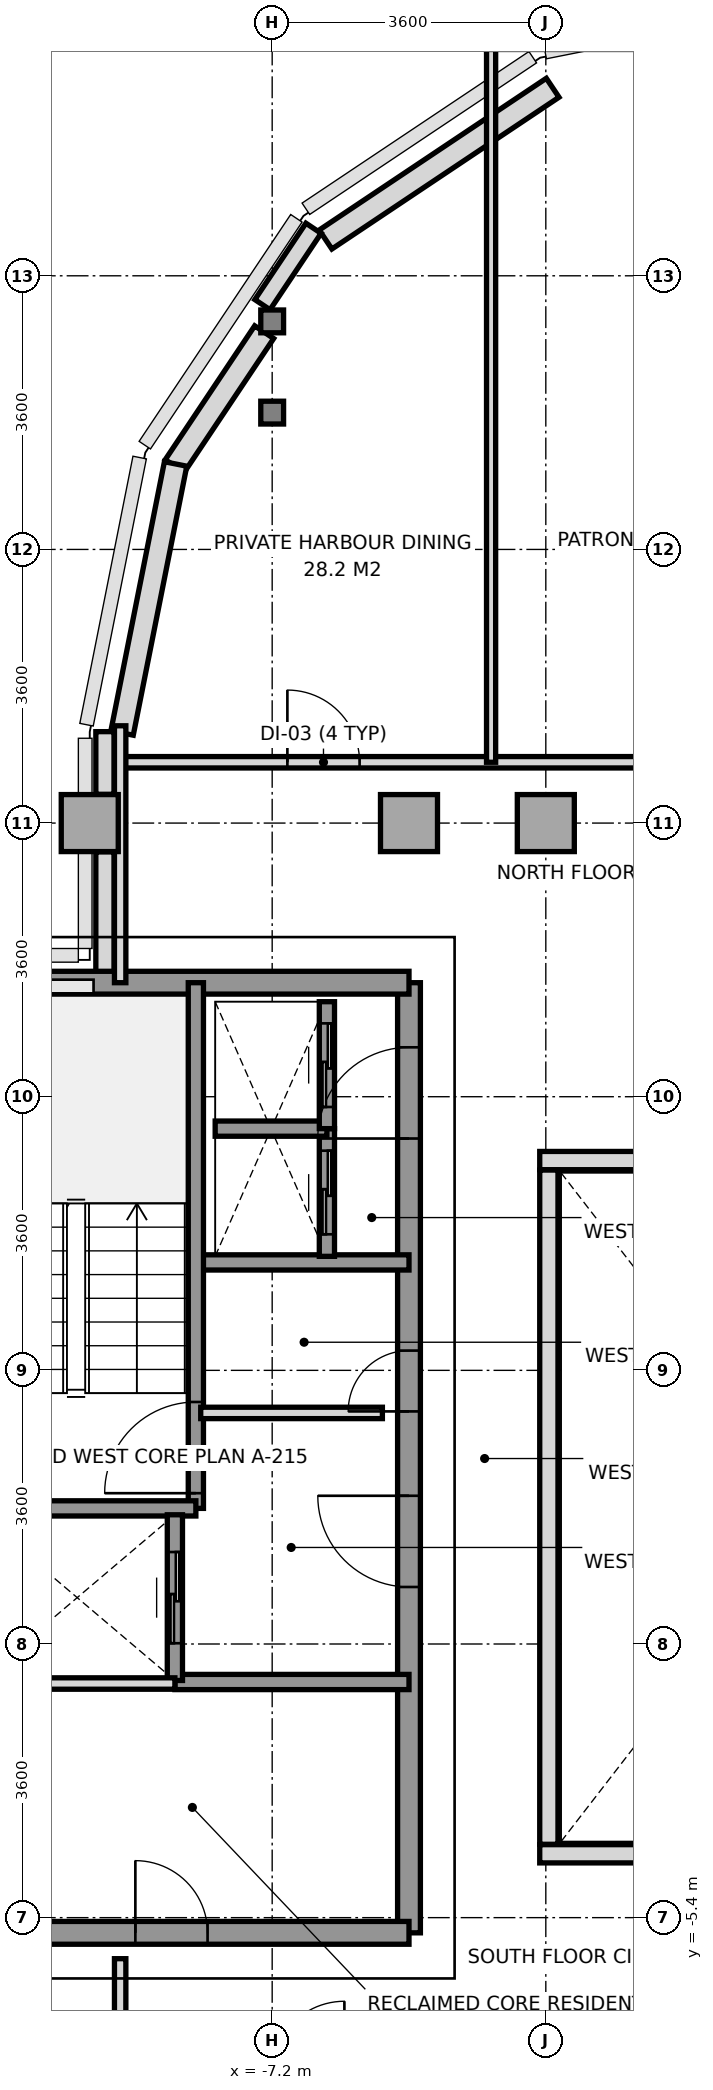
"""IFC4 building model, lengths in metres.
Left out: names, types, materials, properties, quantities, classifications, styles, units other than length and angle.
Written with IfcOpenShell. Run it as: python <this file> out.ifc"""

import sys

from ifc_helpers import new_model, si_unit, direction, frame, frame_2d, origin, origin_2d, place, context, subcontext, project, spatial, rectangle, i_section, extrude, source, transform, mapped, element, fill, save


model = new_model("IFC4")
c1 = context("Model", 3, precision=1e-05, world=origin(), true_north=direction((0.0, 1.0)))
c2 = subcontext(c1, "Body", "Model", "MODEL_VIEW")
j1 = project(units=[si_unit("LENGTHUNIT", "METRE"), si_unit("PLANEANGLEUNIT", "RADIAN")], contexts=[c1])
p1 = place(None, origin())
s1 = spatial("IfcSite", under=j1, at=p1, CompositionType="ELEMENT")
p2 = place(p1, origin())
s2 = spatial("IfcBuilding", under=s1, at=p2, CompositionType="ELEMENT")
p3 = place(p2, frame((0.0, 0.0, 249.2)))
s3 = spatial("IfcBuildingStorey", under=s2, at=p3, CompositionType="ELEMENT", Elevation=249.2)
m1 = source(origin(), c2, "Body", "SweptSolid", [
    extrude(rectangle(XDim=0.75, YDim=0.75, at=origin_2d()), origin(), (0.0, 0.0, 1.0), 3.01),
])
p4 = place(p3, frame((-9.6, 9.0, 0.0), z_axis=(0.0, 0.0, 1.0), x_axis=(1.0, 0.0, 0.0)))
e1 = element("IfcColumn", 1, at=p4, inside=s3, PredefinedType="COLUMN", context=c2, shape_type="MappedRepresentation", body=[
    mapped(m1, transform((0.0, 0.0, 0.0), x_axis=(1.0, 0.0, 0.0), y_axis=(0.0, 1.0, 0.0), z_axis=(0.0, 0.0, 1.0), scale=1.0)),
])
m2 = source(origin(), c2, "Body", "SweptSolid", [
    extrude(i_section(OverallWidth=0.3, OverallDepth=0.3, WebThickness=0.011, FlangeThickness=0.019, at=origin_2d()), origin(), (0.0, 0.0, 1.0), 3.01),
])
for number, where, z_axis, x_axis in (
    (2, (-7.2, 14.4, 0.0), (0.0, 0.0, 1.0), (1.0, 0.0, 0.0)),
    (3, (-7.2, 15.6, 0.0), (0.0, 0.0, 1.0), (1.0, 0.0, 0.0)),
):
    element("IfcColumn", number, at=place(p3, frame(where, z_axis=z_axis, x_axis=x_axis)), inside=s3, PredefinedType="COLUMN", context=c2, shape_type="MappedRepresentation", body=[
        mapped(m2, transform((0.0, 0.0, 0.0), x_axis=(1.0, 0.0, 0.0), y_axis=(0.0, 1.0, 0.0), z_axis=(0.0, 0.0, 1.0), scale=1.0)),
    ])
for number, where, z_axis, x_axis in (
    (4, (-5.4, 9.0, 0.0), (0.0, 0.0, 1.0), (1.0, 0.0, 0.0)),
    (5, (-3.6, 9.0, 0.0), (0.0, 0.0, 1.0), (1.0, 0.0, 0.0)),
):
    element("IfcColumn", number, at=place(p3, frame(where, z_axis=z_axis, x_axis=x_axis)), inside=s3, PredefinedType="COLUMN", context=c2, shape_type="MappedRepresentation", body=[
        mapped(m1, transform((0.0, 0.0, 0.0), x_axis=(1.0, 0.0, 0.0), y_axis=(0.0, 1.0, 0.0), z_axis=(0.0, 0.0, 1.0), scale=1.0)),
    ])
p5 = place(p3, frame((-3.51, 18.674, 0.0), z_axis=(0.0, 0.0, 1.0), x_axis=(-0.831443568068, -0.555609208993, 0.0)))
e6 = element("IfcWall", 6, at=p5, inside=s3, PredefinedType="SOLIDWALL", context=c2, shape_type="SweptSolid", body=[
    extrude(rectangle(XDim=3.594, YDim=0.3, at=frame_2d((1.797, 0.0))), origin(), (0.0, 0.0, 1.0), 3.01),
])
p6 = place(p3, frame((-7.305, 15.458, 0.0), z_axis=(0.0, 0.0, 1.0), x_axis=(-0.555604299396, -0.831446848868, 0.0)))
e7 = element("IfcWall", 7, at=p6, inside=s3, PredefinedType="SOLIDWALL", context=c2, shape_type="SweptSolid", body=[
    extrude(rectangle(XDim=2.118, YDim=0.3, at=frame_2d((1.059, 0.0))), origin(), (0.0, 0.0, 1.0), 2.61),
])
p7 = place(p3, frame((-8.471, 13.725, 0.0), z_axis=(0.0, 0.0, 1.0), x_axis=(-0.195114232679, -0.980780523974, 0.0)))
e8 = element("IfcWall", 8, at=p7, inside=s3, PredefinedType="SOLIDWALL", context=c2, shape_type="SweptSolid", body=[
    extrude(rectangle(XDim=3.609, YDim=0.3, at=frame_2d((1.804, 0.0))), origin(), (0.0, 0.0, 1.0), 3.01),
])
p8 = place(p3, frame((-9.4, 6.953, 0.0), z_axis=(0.0, 0.0, 1.0), x_axis=(0.0, 1.0, 0.0)))
e9 = element("IfcWall", 9, at=p8, inside=s3, PredefinedType="PARAPET", context=c2, shape_type="SweptSolid", body=[
    extrude(rectangle(XDim=1.669, YDim=0.24, at=frame_2d((0.834, 0.0))), origin(), (0.0, 0.0, 1.0), 1.15),
])
p9 = place(p3, frame((-9.4, 9.378, 0.0), z_axis=(0.0, 0.0, 1.0), x_axis=(0.0, 1.0, 0.0)))
e10 = element("IfcWall", 10, at=p9, inside=s3, PredefinedType="PARAPET", context=c2, shape_type="SweptSolid", body=[
    extrude(rectangle(XDim=0.825, YDim=0.24, at=frame_2d((0.413, 0.0))), origin(), (0.0, 0.0, 1.0), 1.15),
])
p10 = place(p3, frame((-7.328, 15.82, 0.0), z_axis=(0.0, 0.0, 1.0), x_axis=(0.555585388542, 0.831459485506, 0.0)))
e11 = element("IfcWall", 11, at=p10, inside=s3, PredefinedType="PARAPET", context=c2, shape_type="SweptSolid", body=[
    extrude(rectangle(XDim=1.209, YDim=0.24, at=frame_2d((0.604, 0.0))), origin(), (0.0, 0.0, 1.0), 1.15),
])
p11 = place(p3, frame((-5.4, -5.6, 0.0), z_axis=(0.0, 0.0, 1.0), x_axis=(0.0, 1.0, 0.0)))
e12 = element("IfcWall", 12, at=p11, inside=s3, PredefinedType="SHEAR", context=c2, shape_type="SweptSolid", body=[
    extrude(rectangle(XDim=12.5, YDim=0.3, at=frame_2d((6.25, 0.0))), origin(), (0.0, 0.0, 1.0), 3.01),
])
p12 = place(p11, frame((4.55, 0.0, 0.0)))
e13 = element("IfcOpeningElement", 13, at=p12, cuts=e12, PredefinedType="OPENING", context=c2, shape_type="SweptSolid", body=[
    extrude(rectangle(XDim=1.2, YDim=2.2, at=frame_2d((0.6, 1.1))), frame((0.0, 0.16, 0.0), z_axis=(0.0, -1.0, 0.0), x_axis=(1.0, 0.0, 0.0)), (0.0, 0.0, 1.0), 0.32),
])
p13 = place(p11, frame((10.45, 0.0, 0.0)))
e14 = element("IfcOpeningElement", 14, at=p13, cuts=e12, PredefinedType="OPENING", context=c2, shape_type="SweptSolid", body=[
    extrude(rectangle(XDim=1.2, YDim=2.2, at=frame_2d((0.6, 1.1))), frame((0.0, 0.16, 0.0), z_axis=(0.0, -1.0, 0.0), x_axis=(1.0, 0.0, 0.0)), (0.0, 0.0, 1.0), 0.32),
])
p14 = place(p11, frame((6.86, 0.0, 0.0)))
e15 = element("IfcOpeningElement", 15, at=p14, cuts=e12, PredefinedType="OPENING", context=c2, shape_type="SweptSolid", body=[
    extrude(rectangle(XDim=0.8, YDim=2.1, at=frame_2d((0.4, 1.05))), frame((0.0, 0.16, 0.0), z_axis=(0.0, -1.0, 0.0), x_axis=(1.0, 0.0, 0.0)), (0.0, 0.0, 1.0), 0.32),
])
p15 = place(p3, frame((-11.356, 6.9, 0.0), z_axis=(0.0, 0.0, 1.0), x_axis=(1.0, 0.0, 0.0)))
e16 = element("IfcWall", 16, at=p15, inside=s3, PredefinedType="SHEAR", context=c2, shape_type="SweptSolid", body=[
    extrude(rectangle(XDim=5.956, YDim=0.3, at=frame_2d((2.978, 0.0))), origin(), (0.0, 0.0, 1.0), 3.01),
])
p16 = place(p3, frame((-13.2, -5.6, 0.0), z_axis=(0.0, 0.0, 1.0), x_axis=(1.0, 0.0, 0.0)))
e17 = element("IfcWall", 17, at=p16, inside=s3, PredefinedType="SHEAR", context=c2, shape_type="SweptSolid", body=[
    extrude(rectangle(XDim=7.8, YDim=0.3, at=frame_2d((3.9, 0.0))), origin(), (0.0, 0.0, 1.0), 3.01),
])
p17 = place(p16, frame((0.65, 0.0, 0.0)))
e18 = element("IfcOpeningElement", 18, at=p17, cuts=e17, PredefinedType="OPENING", context=c2, shape_type="SweptSolid", body=[
    extrude(rectangle(XDim=0.8, YDim=2.1, at=frame_2d((0.4, 1.05))), frame((0.0, 0.16, 0.0), z_axis=(0.0, -1.0, 0.0), x_axis=(1.0, 0.0, 0.0)), (0.0, 0.0, 1.0), 0.32),
])
p18 = place(p16, frame((4.2, 0.0, 0.0)))
e19 = element("IfcOpeningElement", 19, at=p18, cuts=e17, PredefinedType="OPENING", context=c2, shape_type="SweptSolid", body=[
    extrude(rectangle(XDim=0.95, YDim=2.15, at=frame_2d((0.475, 1.075))), frame((0.0, 0.16, 0.0), z_axis=(0.0, -1.0, 0.0), x_axis=(1.0, 0.0, 0.0)), (0.0, 0.0, 1.0), 0.32),
])
p19 = place(p3, frame((-8.18, 3.22, 0.0), z_axis=(0.0, 0.0, 1.0), x_axis=(1.0, 0.0, 0.0)))
e20 = element("IfcWall", 20, at=p19, inside=s3, PredefinedType="SOLIDWALL", context=c2, shape_type="SweptSolid", body=[
    extrude(rectangle(XDim=2.78, YDim=0.2, at=frame_2d((1.39, 0.0))), origin(), (0.0, 0.0, 1.0), 3.01),
])
p20 = place(p3, frame((-8.48, -2.3, 0.0), z_axis=(0.0, 0.0, 1.0), x_axis=(1.0, 0.0, 0.0)))
e21 = element("IfcWall", 21, at=p20, inside=s3, PredefinedType="SOLIDWALL", context=c2, shape_type="SweptSolid", body=[
    extrude(rectangle(XDim=3.08, YDim=0.2, at=frame_2d((1.54, 0.0))), origin(), (0.0, 0.0, 1.0), 3.01),
])
p21 = place(p3, frame((-8.204, -0.016, 0.0), z_axis=(0.0, 0.0, 1.0), x_axis=(0.0, 1.0, 0.0)))
e22 = element("IfcWall", 22, at=p21, inside=s3, PredefinedType="SOLIDWALL", context=c2, shape_type="SweptSolid", body=[
    extrude(rectangle(XDim=6.916, YDim=0.2, at=frame_2d((3.458, 0.0))), origin(), (0.0, 0.0, 1.0), 3.01),
])
p22 = place(p21, frame((0.2, 0.0, 0.0)))
e23 = element("IfcOpeningElement", 23, at=p22, cuts=e22, PredefinedType="OPENING", context=c2, shape_type="SweptSolid", body=[
    extrude(rectangle(XDim=1.2, YDim=2.2, at=frame_2d((0.6, 1.1))), frame((0.0, 0.11, 0.0), z_axis=(0.0, -1.0, 0.0), x_axis=(1.0, 0.0, 0.0)), (0.0, 0.0, 1.0), 0.22),
])
p23 = place(p3, frame((-11.356, -0.016, 0.0), z_axis=(0.0, 0.0, 1.0), x_axis=(1.0, 0.0, 0.0)))
e24 = element("IfcWall", 24, at=p23, inside=s3, PredefinedType="SOLIDWALL", context=c2, shape_type="SweptSolid", body=[
    extrude(rectangle(XDim=3.152, YDim=0.2, at=frame_2d((1.576, 0.0))), origin(), (0.0, 0.0, 1.0), 3.01),
])
p24 = place(p3, frame((-8.48, -2.28, 0.0), z_axis=(0.0, 0.0, 1.0), x_axis=(0.0, 1.0, 0.0)))
e25 = element("IfcWall", 25, at=p24, inside=s3, PredefinedType="SOLIDWALL", context=c2, shape_type="SweptSolid", body=[
    extrude(rectangle(XDim=2.18, YDim=0.2, at=frame_2d((1.09, 0.0))), origin(), (0.0, 0.0, 1.0), 3.01),
])
p25 = place(p24, frame((0.49, 0.0, 0.0)))
e26 = element("IfcOpeningElement", 26, at=p25, cuts=e25, PredefinedType="OPENING", context=c2, shape_type="SweptSolid", body=[
    extrude(rectangle(XDim=1.2, YDim=2.2, at=frame_2d((0.6, 1.1))), frame((0.0, 0.11, 0.0), z_axis=(0.0, -1.0, 0.0), x_axis=(1.0, 0.0, 0.0)), (0.0, 0.0, 1.0), 0.22),
])
p26 = place(p3, frame((-6.48, 3.3, 0.0), z_axis=(0.0, 0.0, 1.0), x_axis=(0.0, 1.0, 0.0)))
e27 = element("IfcWall", 27, at=p26, inside=s3, PredefinedType="SOLIDWALL", context=c2, shape_type="SweptSolid", body=[
    extrude(rectangle(XDim=1.68, YDim=0.2, at=frame_2d((0.84, 0.0))), origin(), (0.0, 0.0, 1.0), 3.01),
])
p27 = place(p26, frame((0.29, 0.0, 0.0)))
e28 = element("IfcOpeningElement", 28, at=p27, cuts=e27, PredefinedType="OPENING", context=c2, shape_type="SweptSolid", body=[
    extrude(rectangle(XDim=1.1, YDim=2.2, at=frame_2d((0.55, 1.1))), frame((0.0, 0.11, 0.0), z_axis=(0.0, -1.0, 0.0), x_axis=(1.0, 0.0, 0.0)), (0.0, 0.0, 1.0), 0.22),
])
p28 = place(p3, frame((-7.95, 4.98, 0.0), z_axis=(0.0, 0.0, 1.0), x_axis=(1.0, 0.0, 0.0)))
e29 = element("IfcWall", 29, at=p28, inside=s3, PredefinedType="SOLIDWALL", context=c2, shape_type="SweptSolid", body=[
    extrude(rectangle(XDim=1.47, YDim=0.2, at=frame_2d((0.735, 0.0))), origin(), (0.0, 0.0, 1.0), 3.01),
])
p29 = place(p3, frame((-6.48, 4.98, 0.0), z_axis=(0.0, 0.0, 1.0), x_axis=(0.0, 1.0, 0.0)))
e30 = element("IfcWall", 30, at=p29, inside=s3, PredefinedType="SOLIDWALL", context=c2, shape_type="SweptSolid", body=[
    extrude(rectangle(XDim=1.67, YDim=0.2, at=frame_2d((0.835, 0.0))), origin(), (0.0, 0.0, 1.0), 3.01),
])
p30 = place(p29, frame((0.285, 0.0, 0.0)))
e31 = element("IfcOpeningElement", 31, at=p30, cuts=e30, PredefinedType="OPENING", context=c2, shape_type="SweptSolid", body=[
    extrude(rectangle(XDim=1.1, YDim=2.2, at=frame_2d((0.55, 1.1))), frame((0.0, 0.11, 0.0), z_axis=(0.0, -1.0, 0.0), x_axis=(1.0, 0.0, 0.0)), (0.0, 0.0, 1.0), 0.22),
])
p31 = place(p3, frame((-8.14, 1.24, 0.0), z_axis=(0.0, 0.0, 1.0), x_axis=(1.0, 0.0, 0.0)))
e32 = element("IfcWall", 32, at=p31, inside=s3, PredefinedType="PARTITIONING", context=c2, shape_type="SweptSolid", body=[
    extrude(rectangle(XDim=2.39, YDim=0.15, at=frame_2d((1.195, 0.0))), origin(), (0.0, 0.0, 1.0), 3.01),
])
p32 = place(p3, frame((-11.04, -2.32, 0.0), z_axis=(0.0, 0.0, 1.0), x_axis=(1.0, 0.0, 0.0)))
e33 = element("IfcWall", 33, at=p32, inside=s3, PredefinedType="PARTITIONING", context=c2, shape_type="SweptSolid", body=[
    extrude(rectangle(XDim=2.56, YDim=0.15, at=frame_2d((1.28, 0.0))), origin(), (0.0, 0.0, 1.0), 3.01),
])
p33 = place(p3, frame((-9.2, 9.8, 0.0), z_axis=(0.0, 0.0, 1.0), x_axis=(1.0, 0.0, 0.0)))
e34 = element("IfcWall", 34, at=p33, inside=s3, PredefinedType="PARTITIONING", context=c2, shape_type="SweptSolid", body=[
    extrude(rectangle(XDim=18.4, YDim=0.15, at=frame_2d((9.2, 0.0))), origin(), (0.0, 0.0, 1.0), 3.01),
])
p34 = place(p33, frame((2.2, 0.0, 0.0)))
e35 = element("IfcOpeningElement", 35, at=p34, cuts=e34, PredefinedType="OPENING", context=c2, shape_type="SweptSolid", body=[
    extrude(rectangle(XDim=0.95, YDim=2.15, at=frame_2d((0.475, 1.075))), frame((0.0, 0.085, 0.0), z_axis=(0.0, -1.0, 0.0), x_axis=(1.0, 0.0, 0.0)), (0.0, 0.0, 1.0), 0.17),
])
p35 = place(p33, frame((8.8, 0.0, 0.0)))
e36 = element("IfcOpeningElement", 36, at=p35, cuts=e34, PredefinedType="OPENING", context=c2, shape_type="SweptSolid", body=[
    extrude(rectangle(XDim=1.1, YDim=2.2, at=frame_2d((0.55, 1.1))), frame((0.0, 0.085, 0.0), z_axis=(0.0, -1.0, 0.0), x_axis=(1.0, 0.0, 0.0)), (0.0, 0.0, 1.0), 0.17),
])
p36 = place(p33, frame((15.2, 0.0, 0.0)))
e37 = element("IfcOpeningElement", 37, at=p36, cuts=e34, PredefinedType="OPENING", context=c2, shape_type="SweptSolid", body=[
    extrude(rectangle(XDim=0.95, YDim=2.15, at=frame_2d((0.475, 1.075))), frame((0.0, 0.085, 0.0), z_axis=(0.0, -1.0, 0.0), x_axis=(1.0, 0.0, 0.0)), (0.0, 0.0, 1.0), 0.17),
])
p37 = place(p3, frame((-9.2, 6.9, 0.0), z_axis=(0.0, 0.0, 1.0), x_axis=(0.0, 1.0, 0.0)))
e38 = element("IfcWall", 38, at=p37, inside=s3, PredefinedType="PARTITIONING", context=c2, shape_type="SweptSolid", body=[
    extrude(rectangle(XDim=3.38, YDim=0.15, at=frame_2d((1.69, 0.0))), origin(), (0.0, 0.0, 1.0), 2.61),
])
p38 = place(p3, frame((-4.32, 9.8, 0.0), z_axis=(0.0, 0.0, 1.0), x_axis=(0.0, 1.0, 0.0)))
e39 = element("IfcWall", 39, at=p38, inside=s3, PredefinedType="PARTITIONING", context=c2, shape_type="SweptSolid", body=[
    extrude(rectangle(XDim=9.45, YDim=0.12, at=frame_2d((4.725, 0.0))), origin(), (0.0, 0.0, 1.0), 2.61),
])
p39 = place(p3, frame((-9.2, -10.28, 0.0), z_axis=(0.0, 0.0, 1.0), x_axis=(0.0, 1.0, 0.0)))
e40 = element("IfcWall", 40, at=p39, inside=s3, PredefinedType="PARTITIONING", context=c2, shape_type="SweptSolid", body=[
    extrude(rectangle(XDim=4.34, YDim=0.15, at=frame_2d((2.17, 0.0))), origin(), (0.0, 0.0, 1.0), 2.61),
])
for number, where, z_axis, x_axis in (
    (41, (-3.68, -4.56, 0.0), (0.0, 0.0, 1.0), (1.0, 0.0, 0.0)),
    (42, (-3.68, 4.56, 0.0), (0.0, 0.0, 1.0), (1.0, 0.0, 0.0)),
):
    element("IfcWall", number, at=place(p3, frame(where, z_axis=z_axis, x_axis=x_axis)), inside=s3, PredefinedType="PARAPET", context=c2, shape_type="SweptSolid", body=[
        extrude(rectangle(XDim=7.36, YDim=0.24, at=frame_2d((3.68, 0.0))), origin(), (0.0, 0.0, 1.0), 1.15),
    ])
p40 = place(p3, frame((-3.56, -4.435, 0.0), z_axis=(0.0, 0.0, 1.0), x_axis=(0.0, 1.0, 0.0)))
e43 = element("IfcWall", 43, at=p40, inside=s3, PredefinedType="PARAPET", context=c2, shape_type="SweptSolid", body=[
    extrude(rectangle(XDim=8.87, YDim=0.24, at=frame_2d((4.435, 0.0))), origin(), (0.0, 0.0, 1.0), 1.15),
])
m3 = source(origin(), c2, "Body", "SweptSolid", [
    extrude(rectangle(XDim=1.2, YDim=2.2, at=frame_2d((0.6, 1.1))), frame((0.0, 0.025, 0.0), z_axis=(0.0, -1.0, 0.0), x_axis=(1.0, 0.0, 0.0)), (0.0, 0.0, 1.0), 0.05),
])
p41 = place(p22, origin())
e44 = element("IfcDoor", 44, at=p41, inside=s3, OperationType="SINGLE_SWING_LEFT", PredefinedType="DOOR", context=c2, shape_type="MappedRepresentation", body=[
    mapped(m3, transform((0.0, 0.0, 0.0), x_axis=(1.0, 0.0, 0.0), y_axis=(0.0, 1.0, 0.0), z_axis=(0.0, 0.0, 1.0), scale=1.0)),
])
fill(e23, e44)
p42 = place(p12, origin())
e45 = element("IfcDoor", 45, at=p42, inside=s3, OperationType="SINGLE_SWING_RIGHT", PredefinedType="DOOR", context=c2, shape_type="MappedRepresentation", body=[
    mapped(m3, transform((0.0, 0.0, 0.0), x_axis=(1.0, 0.0, 0.0), y_axis=(0.0, 1.0, 0.0), z_axis=(0.0, 0.0, 1.0), scale=1.0)),
])
fill(e13, e45)
p43 = place(p13, origin())
e46 = element("IfcDoor", 46, at=p43, inside=s3, OperationType="SINGLE_SWING_LEFT", PredefinedType="DOOR", context=c2, shape_type="MappedRepresentation", body=[
    mapped(m3, transform((0.0, 0.0, 0.0), x_axis=(1.0, 0.0, 0.0), y_axis=(0.0, 1.0, 0.0), z_axis=(0.0, 0.0, 1.0), scale=1.0)),
])
fill(e14, e46)
m4 = source(origin(), c2, "Body", "SweptSolid", [
    extrude(rectangle(XDim=0.8, YDim=2.1, at=frame_2d((0.4, 1.05))), frame((0.0, 0.025, 0.0), z_axis=(0.0, -1.0, 0.0), x_axis=(1.0, 0.0, 0.0)), (0.0, 0.0, 1.0), 0.05),
])
p44 = place(p14, origin())
e47 = element("IfcDoor", 47, at=p44, inside=s3, OperationType="SINGLE_SWING_LEFT", PredefinedType="DOOR", context=c2, shape_type="MappedRepresentation", body=[
    mapped(m4, transform((0.0, 0.0, 0.0), x_axis=(1.0, 0.0, 0.0), y_axis=(0.0, 1.0, 0.0), z_axis=(0.0, 0.0, 1.0), scale=1.0)),
])
fill(e15, e47)
m5 = source(origin(), c2, "Body", "SweptSolid", [
    extrude(rectangle(XDim=0.95, YDim=2.15, at=frame_2d((0.475, 1.075))), frame((0.0, 0.025, 0.0), z_axis=(0.0, -1.0, 0.0), x_axis=(1.0, 0.0, 0.0)), (0.0, 0.0, 1.0), 0.05),
])
p45 = place(p18, origin())
e48 = element("IfcDoor", 48, at=p45, inside=s3, OperationType="SINGLE_SWING_LEFT", PredefinedType="DOOR", context=c2, shape_type="MappedRepresentation", body=[
    mapped(m5, transform((0.0, 0.0, 0.0), x_axis=(1.0, 0.0, 0.0), y_axis=(0.0, 1.0, 0.0), z_axis=(0.0, 0.0, 1.0), scale=1.0)),
])
fill(e19, e48)
p46 = place(p25, origin())
e49 = element("IfcDoor", 49, at=p46, inside=s3, OperationType="SLIDING_TO_RIGHT", PredefinedType="DOOR", context=c2, shape_type="MappedRepresentation", body=[
    mapped(m3, transform((0.0, 0.0, 0.0), x_axis=(1.0, 0.0, 0.0), y_axis=(0.0, 1.0, 0.0), z_axis=(0.0, 0.0, 1.0), scale=1.0)),
])
fill(e26, e49)
m6 = source(origin(), c2, "Body", "SweptSolid", [
    extrude(rectangle(XDim=1.1, YDim=2.2, at=frame_2d((0.55, 1.1))), frame((0.0, 0.025, 0.0), z_axis=(0.0, -1.0, 0.0), x_axis=(1.0, 0.0, 0.0)), (0.0, 0.0, 1.0), 0.05),
])
p47 = place(p27, origin())
e50 = element("IfcDoor", 50, at=p47, inside=s3, OperationType="SLIDING_TO_LEFT", PredefinedType="DOOR", context=c2, shape_type="MappedRepresentation", body=[
    mapped(m6, transform((0.0, 0.0, 0.0), x_axis=(1.0, 0.0, 0.0), y_axis=(0.0, 1.0, 0.0), z_axis=(0.0, 0.0, 1.0), scale=1.0)),
])
fill(e28, e50)
p48 = place(p30, origin())
e51 = element("IfcDoor", 51, at=p48, inside=s3, OperationType="SLIDING_TO_LEFT", PredefinedType="DOOR", context=c2, shape_type="MappedRepresentation", body=[
    mapped(m6, transform((0.0, 0.0, 0.0), x_axis=(1.0, 0.0, 0.0), y_axis=(0.0, 1.0, 0.0), z_axis=(0.0, 0.0, 1.0), scale=1.0)),
])
fill(e31, e51)
p49 = place(p34, origin())
e52 = element("IfcDoor", 52, at=p49, inside=s3, OperationType="SINGLE_SWING_LEFT", PredefinedType="DOOR", context=c2, shape_type="MappedRepresentation", body=[
    mapped(m5, transform((0.0, 0.0, 0.0), x_axis=(1.0, 0.0, 0.0), y_axis=(0.0, 1.0, 0.0), z_axis=(0.0, 0.0, 1.0), scale=1.0)),
])
fill(e35, e52)
save(model, sys.argv[1])
